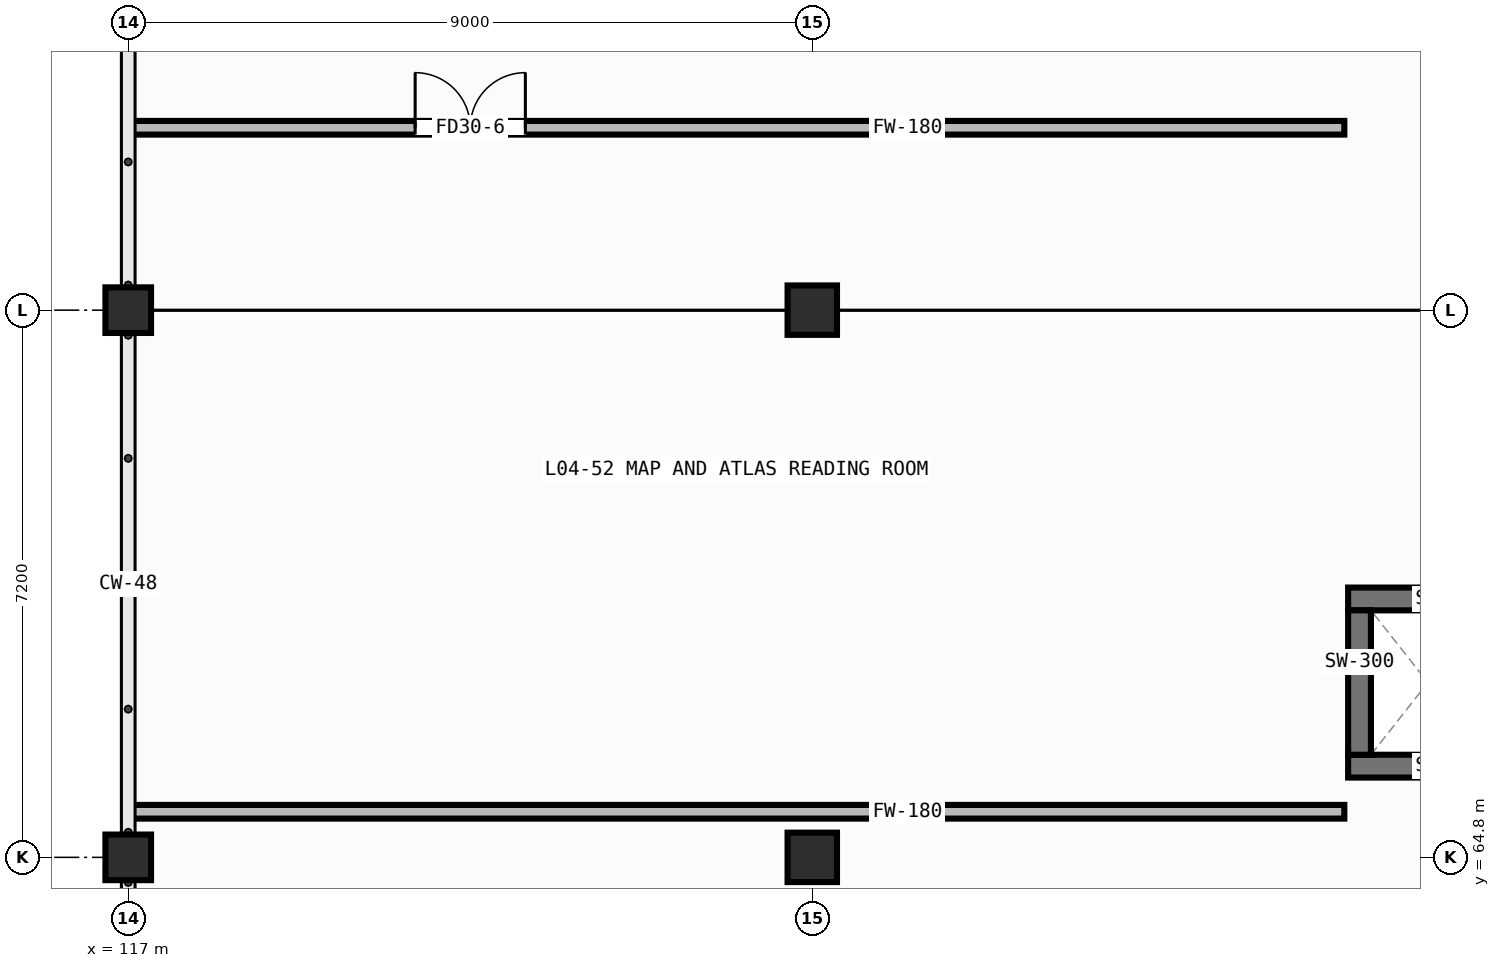
"""IFC4 building model, lengths in metres.
Left out: names, types, materials, properties, quantities, classifications, styles, units other than length and angle.
Written with IfcOpenShell. Run it as: python <this file> out.ifc"""

import sys

from ifc_helpers import new_model, si_unit, direction, frame, frame_2d, origin, origin_2d, place, context, subcontext, project, spatial, rectangle, hollow_rectangle, extrude, element, fill, save


model = new_model("IFC4")
c1 = context("Model", 3, precision=1e-05, world=origin(), true_north=direction((0.0, 1.0)))
c2 = subcontext(c1, "Body", "Model", "MODEL_VIEW")
j1 = project(units=[si_unit("LENGTHUNIT", "METRE"), si_unit("PLANEANGLEUNIT", "RADIAN")], contexts=[c1])
p1 = place(None, origin())
s1 = spatial("IfcSite", under=j1, at=p1, CompositionType="ELEMENT")
p2 = place(p1, origin())
s2 = spatial("IfcBuilding", under=s1, at=p2, CompositionType="ELEMENT")
p3 = place(p2, frame((0.0, 0.0, 12.8)))
s3 = spatial("IfcBuildingStorey", under=s2, at=p3, CompositionType="ELEMENT", Elevation=12.8)
for number, where, z_axis, x_axis in (
    (1, (117.0, 64.8, 0.0), (0.0, 0.0, 1.0), (1.0, 0.0, 0.0)),
    (2, (117.0, 72.0, 0.0), (0.0, 0.0, 1.0), (1.0, 0.0, 0.0)),
):
    element("IfcColumn", number, at=place(p3, frame(where, z_axis=z_axis, x_axis=x_axis)), inside=s3, PredefinedType="COLUMN", context=c2, shape_type="SweptSolid", body=[
        extrude(hollow_rectangle(XDim=0.6, YDim=0.6, WallThickness=0.025, at=origin_2d()), origin(), (0.0, 0.0, 1.0), 4.2),
    ])
for number, where, z_axis, x_axis in (
    (3, (126.0, 64.8, 0.0), (0.0, 0.0, 1.0), (1.0, 0.0, 0.0)),
    (4, (126.0, 72.0, 0.0), (0.0, 0.0, 1.0), (1.0, 0.0, 0.0)),
):
    element("IfcColumn", number, at=place(p3, frame(where, z_axis=z_axis, x_axis=x_axis)), inside=s3, PredefinedType="COLUMN", context=c2, shape_type="SweptSolid", body=[
        extrude(hollow_rectangle(XDim=0.65, YDim=0.65, WallThickness=0.025, at=origin_2d()), origin(), (0.0, 0.0, 1.0), 4.2),
    ])
for number, where, z_axis, x_axis in (
    (5, (133.05, 66.0, 0.0), (0.0, 0.0, 1.0), (1.0, 0.0, 0.0)),
    (6, (133.05, 68.2, 0.0), (0.0, 0.0, 1.0), (1.0, 0.0, 0.0)),
):
    element("IfcWall", number, at=place(p3, frame(where, z_axis=z_axis, x_axis=x_axis)), inside=s3, PredefinedType="SHEAR", context=c2, shape_type="SweptSolid", body=[
        extrude(rectangle(XDim=2.1, YDim=0.3, at=frame_2d((1.05, 0.0))), origin(), (0.0, 0.0, 1.0), 3.94),
    ])
p4 = place(p3, frame((133.2, 66.15, 0.0), z_axis=(0.0, 0.0, 1.0), x_axis=(0.0, 1.0, 0.0)))
e7 = element("IfcWall", 7, at=p4, inside=s3, PredefinedType="SHEAR", context=c2, shape_type="SweptSolid", body=[
    extrude(rectangle(XDim=1.9, YDim=0.3, at=frame_2d((0.95, 0.0))), origin(), (0.0, 0.0, 1.0), 3.94),
])
p5 = place(p3, frame((117.035, 65.4, 0.0), z_axis=(0.0, 0.0, 1.0), x_axis=(1.0, 0.0, 0.0)))
e8 = element("IfcWall", 8, at=p5, inside=s3, PredefinedType="PARTITIONING", context=c2, shape_type="SweptSolid", body=[
    extrude(rectangle(XDim=15.965, YDim=0.18, at=frame_2d((7.982, 0.0))), origin(), (0.0, 0.0, 1.0), 3.94),
])
p6 = place(p3, frame((117.035, 74.4, 0.0), z_axis=(0.0, 0.0, 1.0), x_axis=(1.0, 0.0, 0.0)))
e9 = element("IfcWall", 9, at=p6, inside=s3, PredefinedType="PARTITIONING", context=c2, shape_type="SweptSolid", body=[
    extrude(rectangle(XDim=15.965, YDim=0.18, at=frame_2d((7.982, 0.0))), origin(), (0.0, 0.0, 1.0), 3.94),
])
p7 = place(p6, frame((3.74, 0.0, 0.0)))
e10 = element("IfcOpeningElement", 10, at=p7, cuts=e9, PredefinedType="OPENING", context=c2, shape_type="SweptSolid", body=[
    extrude(rectangle(XDim=1.45, YDim=2.1, at=frame_2d((0.725, 1.05))), frame((0.0, 0.102, 0.0), z_axis=(0.0, -1.0, 0.0), x_axis=(1.0, 0.0, 0.0)), (0.0, 0.0, 1.0), 0.204),
])
p8 = place(p7, origin())
e11 = element("IfcDoor", 11, at=p8, inside=s3, OperationType="DOUBLE_DOOR_SINGLE_SWING", PredefinedType="DOOR", context=c2, shape_type="SweptSolid", body=[
    extrude(rectangle(XDim=1.45, YDim=2.1, at=frame_2d((0.725, 1.05))), frame((0.0, 0.025, 0.0), z_axis=(0.0, -1.0, 0.0), x_axis=(1.0, 0.0, 0.0)), (0.0, 0.0, 1.0), 0.05),
])
fill(e10, e11)
save(model, sys.argv[1])
